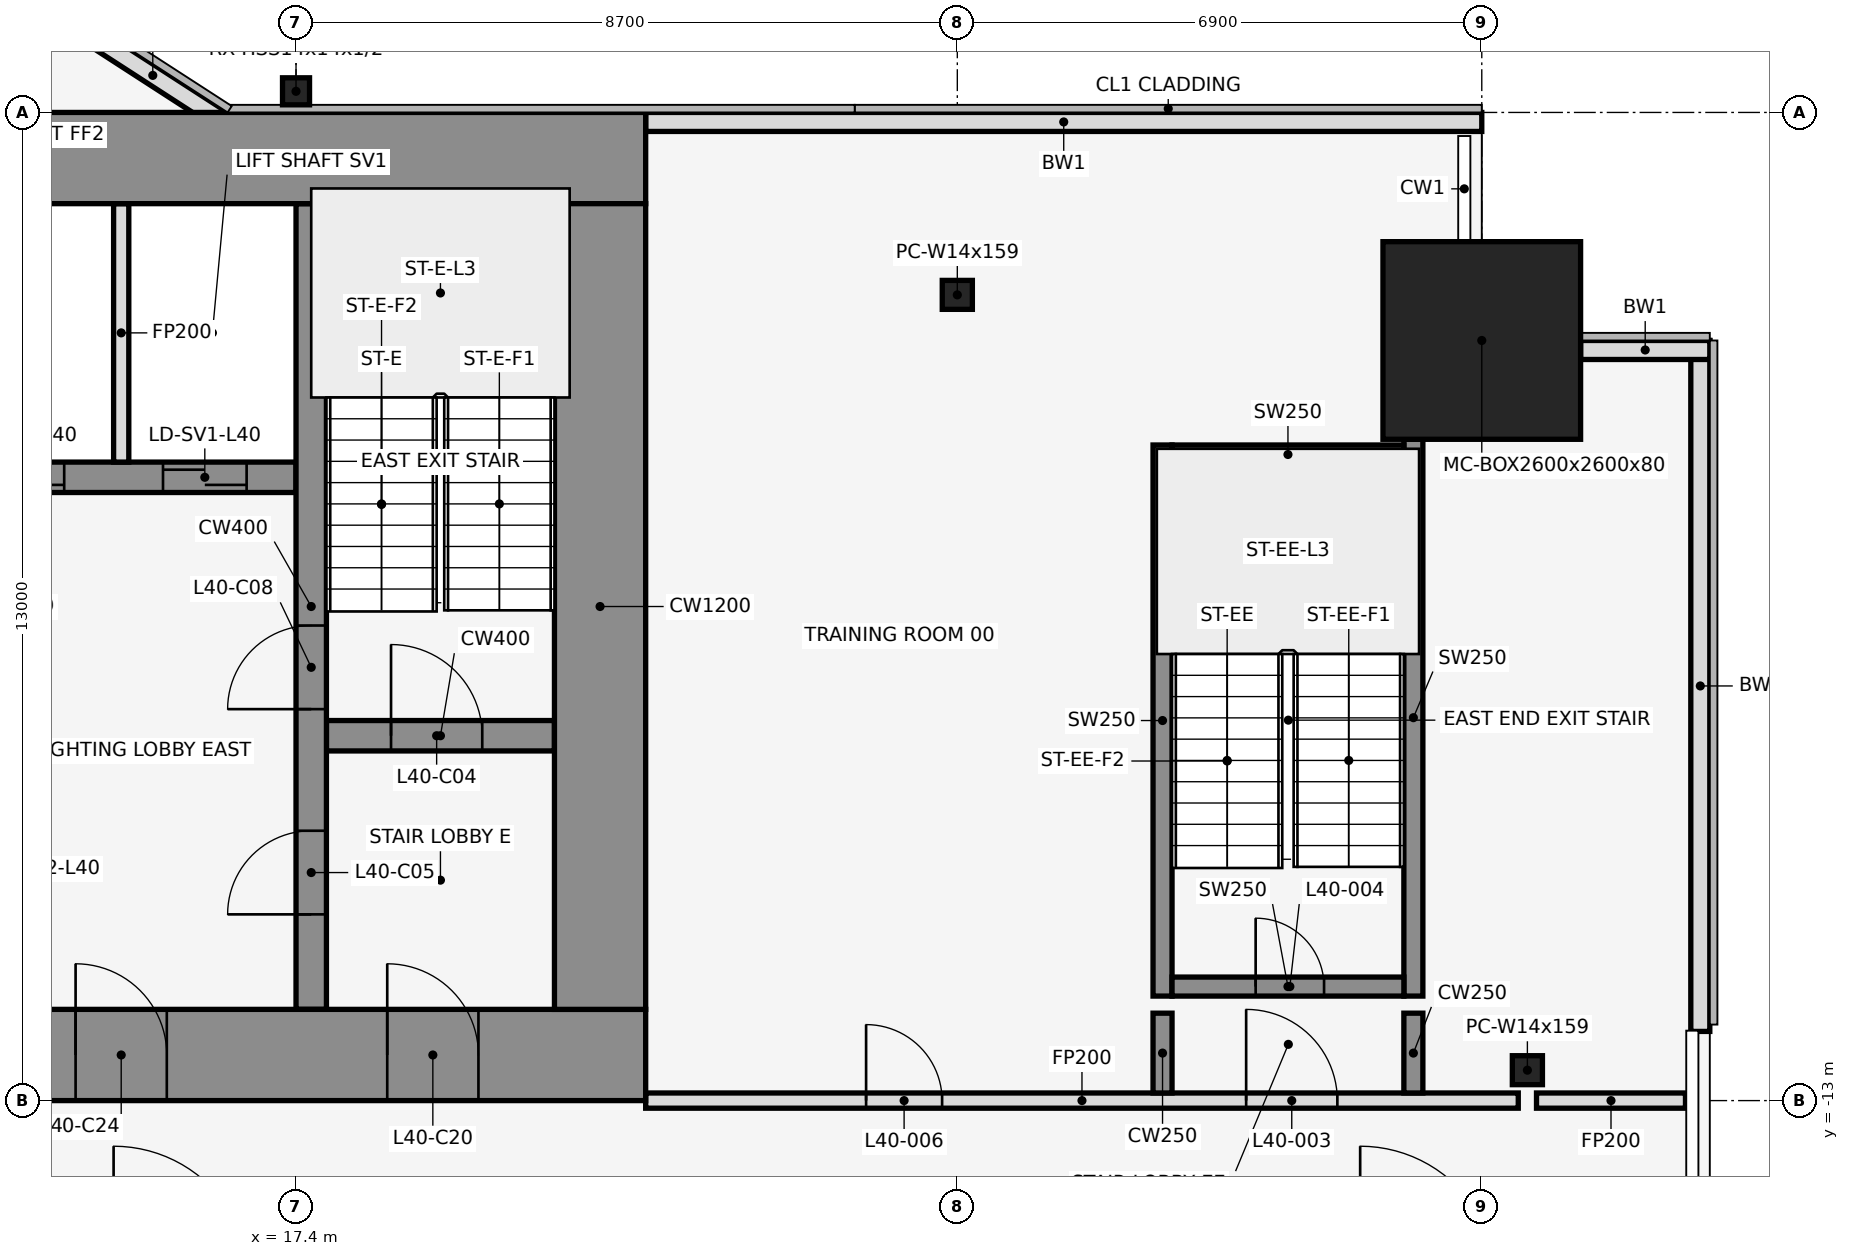
"""IFC4 building model, lengths in metres.
Left out: names, types, materials, properties, quantities, classifications, styles, units other than length and angle.
Written with IfcOpenShell. Run it as: python <this file> out.ifc"""

import sys

from ifc_helpers import new_model, si_unit, direction, frame, frame_2d, origin, origin_2d, place, context, subcontext, project, spatial, rectangle, hollow_rectangle, i_section, extrude, element, fill, save


model = new_model("IFC4")
c1 = context("Model", 3, precision=1e-05, world=origin(), true_north=direction((0.0, 1.0)))
c2 = subcontext(c1, "Body", "Model", "MODEL_VIEW")
j1 = project(units=[si_unit("LENGTHUNIT", "METRE"), si_unit("PLANEANGLEUNIT", "RADIAN")], contexts=[c1])
p1 = place(None, origin())
s1 = spatial("IfcSite", under=j1, at=p1, CompositionType="ELEMENT")
p2 = place(p1, origin())
s2 = spatial("IfcBuilding", under=s1, at=p2, CompositionType="ELEMENT")
p3 = place(p2, frame((0.0, 0.0, 181.4)))
s3 = spatial("IfcBuildingStorey", under=s2, at=p3, CompositionType="ELEMENT", Elevation=181.4)
p4 = place(p3, frame((26.1, -2.4, 0.0), z_axis=(0.0, 0.0, 1.0), x_axis=(1.0, 0.0, 0.0)))
e1 = element("IfcColumn", 1, at=p4, inside=s3, PredefinedType="COLUMN", context=c2, shape_type="SweptSolid", body=[
    extrude(i_section(OverallWidth=0.396, OverallDepth=0.381, WebThickness=0.019, FlangeThickness=0.03, at=origin_2d()), origin(), (0.0, 0.0, 1.0), 4.1),
])
p5 = place(p3, frame((33.0, -3.0, 0.0), z_axis=(0.0, 0.0, 1.0), x_axis=(1.0, 0.0, 0.0)))
e2 = element("IfcColumn", 2, at=p5, inside=s3, PredefinedType="COLUMN", context=c2, shape_type="SweptSolid", body=[
    extrude(hollow_rectangle(XDim=2.6, YDim=2.6, WallThickness=0.08, at=origin_2d()), origin(), (0.0, 0.0, 1.0), 4.1),
])
p6 = place(p3, frame((17.4, 0.278, 0.0), z_axis=(0.0, 0.0, 1.0), x_axis=(1.0, 0.0, 0.0)))
e3 = element("IfcColumn", 3, at=p6, inside=s3, PredefinedType="COLUMN", context=c2, shape_type="SweptSolid", body=[
    extrude(hollow_rectangle(XDim=0.356, YDim=0.356, WallThickness=0.012, at=origin_2d()), origin(), (0.0, 0.0, 1.0), 4.1),
])
p7 = place(p3, frame((33.6, -12.6, 0.0), z_axis=(0.0, 0.0, 1.0), x_axis=(1.0, 0.0, 0.0)))
e4 = element("IfcColumn", 4, at=p7, inside=s3, PredefinedType="COLUMN", context=c2, shape_type="SweptSolid", body=[
    extrude(i_section(OverallWidth=0.396, OverallDepth=0.381, WebThickness=0.019, FlangeThickness=0.03, at=origin_2d()), origin(), (0.0, 0.0, 1.0), 4.1),
])
p8 = place(p3, frame((33.0, -0.125, 0.0), z_axis=(0.0, 0.0, 1.0), x_axis=(-1.0, 0.0, 0.0)))
e5 = element("IfcWall", 5, at=p8, inside=s3, PredefinedType="STANDARD", context=c2, shape_type="SweptSolid", body=[
    extrude(rectangle(XDim=11.0, YDim=0.25, at=frame_2d((5.5, 0.0))), origin(), (0.0, 0.0, 1.0), 3.9),
])
p9 = place(p3, frame((16.432, -0.105, 0.0), z_axis=(0.0, 0.0, 1.0), x_axis=(-0.83981312244, 0.542875602121, 0.0)))
e6 = element("IfcWall", 6, at=p9, inside=s3, PredefinedType="STANDARD", context=c2, shape_type="SweptSolid", body=[
    extrude(rectangle(XDim=2.183, YDim=0.25, at=frame_2d((1.091, 0.0))), origin(), (0.0, 0.0, 1.0), 3.9),
])
p10 = place(p3, frame((35.875, -12.09, 0.0), z_axis=(0.0, 0.0, 1.0), x_axis=(0.0, 1.0, 0.0)))
e7 = element("IfcWall", 7, at=p10, inside=s3, PredefinedType="STANDARD", context=c2, shape_type="SweptSolid", body=[
    extrude(rectangle(XDim=9.09, YDim=0.25, at=frame_2d((4.545, 0.0))), origin(), (0.0, 0.0, 1.0), 3.9),
])
p11 = place(p3, frame((36.0, -3.125, 0.0), z_axis=(0.0, 0.0, 1.0), x_axis=(-1.0, 0.0, 0.0)))
e8 = element("IfcWall", 8, at=p11, inside=s3, PredefinedType="STANDARD", context=c2, shape_type="SweptSolid", body=[
    extrude(rectangle(XDim=1.7, YDim=0.25, at=frame_2d((0.85, 0.0))), origin(), (0.0, 0.0, 1.0), 3.9),
])
p12 = place(p3, frame((28.8, -11.625, 0.0), z_axis=(0.0, 0.0, 1.0), x_axis=(0.0, 1.0, 0.0)))
e9 = element("IfcWall", 9, at=p12, inside=s3, PredefinedType="SHEAR", context=c2, shape_type="SweptSolid", body=[
    extrude(rectangle(XDim=7.25, YDim=0.25, at=frame_2d((3.625, 0.0))), origin(), (0.0, 0.0, 1.0), 4.1),
])
p13 = place(p3, frame((32.1, -11.625, 0.0), z_axis=(0.0, 0.0, 1.0), x_axis=(0.0, 1.0, 0.0)))
e10 = element("IfcWall", 10, at=p13, inside=s3, PredefinedType="SHEAR", context=c2, shape_type="SweptSolid", body=[
    extrude(rectangle(XDim=7.325, YDim=0.25, at=frame_2d((3.663, 0.0))), origin(), (0.0, 0.0, 1.0), 4.1),
])
p14 = place(p3, frame((28.925, -11.5, 0.0), z_axis=(0.0, 0.0, 1.0), x_axis=(1.0, 0.0, 0.0)))
e11 = element("IfcWall", 11, at=p14, inside=s3, PredefinedType="SHEAR", context=c2, shape_type="SweptSolid", body=[
    extrude(rectangle(XDim=3.05, YDim=0.25, at=frame_2d((1.525, 0.0))), origin(), (0.0, 0.0, 1.0), 4.1),
])
p15 = place(p14, frame((1.1, 0.0, 0.0)))
e12 = element("IfcOpeningElement", 12, at=p15, cuts=e11, PredefinedType="OPENING", context=c2, shape_type="SweptSolid", body=[
    extrude(rectangle(XDim=0.9, YDim=2.1, at=frame_2d((0.45, 1.05))), frame((0.0, 0.137, 0.0), z_axis=(0.0, -1.0, 0.0), x_axis=(1.0, 0.0, 0.0)), (0.0, 0.0, 1.0), 0.274),
])
p16 = place(p3, frame((28.925, -4.5, 0.0), z_axis=(0.0, 0.0, 1.0), x_axis=(1.0, 0.0, 0.0)))
e13 = element("IfcWall", 13, at=p16, inside=s3, PredefinedType="SHEAR", context=c2, shape_type="SweptSolid", body=[
    extrude(rectangle(XDim=3.05, YDim=0.25, at=frame_2d((1.525, 0.0))), origin(), (0.0, 0.0, 1.0), 4.1),
])
p17 = place(p3, frame((22.0, -13.0, 0.0), z_axis=(0.0, 0.0, 1.0), x_axis=(1.0, 0.0, 0.0)))
e14 = element("IfcWall", 14, at=p17, inside=s3, PredefinedType="PARTITIONING", context=c2, shape_type="SweptSolid", body=[
    extrude(rectangle(XDim=11.48, YDim=0.2, at=frame_2d((5.74, 0.0))), origin(), (0.0, 0.0, 1.0), 2.79),
])
p18 = place(p17, frame((7.9, 0.0, 0.0)))
e15 = element("IfcOpeningElement", 15, at=p18, cuts=e14, PredefinedType="OPENING", context=c2, shape_type="SweptSolid", body=[
    extrude(rectangle(XDim=1.2, YDim=2.1, at=frame_2d((0.6, 1.05))), frame((0.0, 0.112, 0.0), z_axis=(0.0, -1.0, 0.0), x_axis=(1.0, 0.0, 0.0)), (0.0, 0.0, 1.0), 0.224),
])
p19 = place(p17, frame((2.9, 0.0, 0.0)))
e16 = element("IfcOpeningElement", 16, at=p19, cuts=e14, PredefinedType="OPENING", context=c2, shape_type="SweptSolid", body=[
    extrude(rectangle(XDim=1.0, YDim=2.1, at=frame_2d((0.5, 1.05))), frame((0.0, 0.112, 0.0), z_axis=(0.0, -1.0, 0.0), x_axis=(1.0, 0.0, 0.0)), (0.0, 0.0, 1.0), 0.224),
])
p20 = place(p3, frame((33.72, -13.0, 0.0), z_axis=(0.0, 0.0, 1.0), x_axis=(1.0, 0.0, 0.0)))
e17 = element("IfcWall", 17, at=p20, inside=s3, PredefinedType="PARTITIONING", context=c2, shape_type="SweptSolid", body=[
    extrude(rectangle(XDim=1.96, YDim=0.2, at=frame_2d((0.98, 0.0))), origin(), (0.0, 0.0, 1.0), 2.79),
])
for number, where, z_axis, x_axis in (
    (18, (28.8, -12.9, 0.0), (0.0, 0.0, 1.0), (0.0, 1.0, 0.0)),
    (19, (32.1, -12.9, 0.0), (0.0, 0.0, 1.0), (0.0, 1.0, 0.0)),
):
    element("IfcWall", number, at=place(p3, frame(where, z_axis=z_axis, x_axis=x_axis)), inside=s3, PredefinedType="SHEAR", context=c2, shape_type="SweptSolid", body=[
        extrude(rectangle(XDim=1.05, YDim=0.25, at=frame_2d((0.525, 0.0))), origin(), (0.0, 0.0, 1.0), 4.1),
    ])
p21 = place(p3, frame((17.8, -8.2, 0.0), z_axis=(0.0, 0.0, 1.0), x_axis=(1.0, 0.0, 0.0)))
e20 = element("IfcWall", 20, at=p21, inside=s3, PredefinedType="SHEAR", context=c2, shape_type="SweptSolid", body=[
    extrude(rectangle(XDim=3.0, YDim=0.4, at=frame_2d((1.5, 0.0))), origin(), (0.0, 0.0, 1.0), 4.1),
])
p22 = place(p21, frame((0.85, 0.0, 0.0)))
e21 = element("IfcOpeningElement", 21, at=p22, cuts=e20, PredefinedType="OPENING", context=c2, shape_type="SweptSolid", body=[
    extrude(rectangle(XDim=1.2, YDim=2.1, at=frame_2d((0.6, 1.05))), frame((0.0, 0.212, 0.0), z_axis=(0.0, -1.0, 0.0), x_axis=(1.0, 0.0, 0.0)), (0.0, 0.0, 1.0), 0.424),
])
p23 = place(p3, frame((3.8, -4.8, 0.0), z_axis=(0.0, 0.0, 1.0), x_axis=(1.0, 0.0, 0.0)))
e22 = element("IfcWall", 22, at=p23, inside=s3, PredefinedType="SHEAR", context=c2, shape_type="SweptSolid", body=[
    extrude(rectangle(XDim=13.6, YDim=0.4, at=frame_2d((6.8, 0.0))), origin(), (0.0, 0.0, 1.0), 4.1),
])
p24 = place(p23, frame((9.45, 0.0, 0.0)))
e23 = element("IfcOpeningElement", 23, at=p24, cuts=e22, PredefinedType="OPENING", context=c2, shape_type="SweptSolid", body=[
    extrude(rectangle(XDim=1.1, YDim=2.1, at=frame_2d((0.55, 1.05))), frame((0.0, 0.212, 0.0), z_axis=(0.0, -1.0, 0.0), x_axis=(1.0, 0.0, 0.0)), (0.0, 0.0, 1.0), 0.424),
])
p25 = place(p23, frame((11.85, 0.0, 0.0)))
e24 = element("IfcOpeningElement", 24, at=p25, cuts=e22, PredefinedType="OPENING", context=c2, shape_type="SweptSolid", body=[
    extrude(rectangle(XDim=1.1, YDim=2.1, at=frame_2d((0.55, 1.05))), frame((0.0, 0.212, 0.0), z_axis=(0.0, -1.0, 0.0), x_axis=(1.0, 0.0, 0.0)), (0.0, 0.0, 1.0), 0.424),
])
p26 = place(p23, frame((3.95, 0.0, 0.0)))
e25 = element("IfcOpeningElement", 25, at=p26, cuts=e22, PredefinedType="OPENING", context=c2, shape_type="SweptSolid", body=[
    extrude(rectangle(XDim=0.9, YDim=2.1, at=frame_2d((0.45, 1.05))), frame((0.0, 0.212, 0.0), z_axis=(0.0, -1.0, 0.0), x_axis=(1.0, 0.0, 0.0)), (0.0, 0.0, 1.0), 0.424),
])
p27 = place(p3, frame((15.1, -4.6, 0.0), z_axis=(0.0, 0.0, 1.0), x_axis=(0.0, 1.0, 0.0)))
e26 = element("IfcWall", 26, at=p27, inside=s3, PredefinedType="PARTITIONING", context=c2, shape_type="SweptSolid", body=[
    extrude(rectangle(XDim=3.4, YDim=0.2, at=frame_2d((1.7, 0.0))), origin(), (0.0, 0.0, 1.0), 2.79),
])
p28 = place(p3, frame((17.6, -11.8, 0.0), z_axis=(0.0, 0.0, 1.0), x_axis=(0.0, 1.0, 0.0)))
e27 = element("IfcWall", 27, at=p28, inside=s3, PredefinedType="SHEAR", context=c2, shape_type="SweptSolid", body=[
    extrude(rectangle(XDim=10.6, YDim=0.4, at=frame_2d((5.3, 0.0))), origin(), (0.0, 0.0, 1.0), 4.1),
])
p29 = place(p28, frame((1.25, 0.0, 0.0)))
e28 = element("IfcOpeningElement", 28, at=p29, cuts=e27, PredefinedType="OPENING", context=c2, shape_type="SweptSolid", body=[
    extrude(rectangle(XDim=1.1, YDim=2.1, at=frame_2d((0.55, 1.05))), frame((0.0, 0.212, 0.0), z_axis=(0.0, -1.0, 0.0), x_axis=(1.0, 0.0, 0.0)), (0.0, 0.0, 1.0), 0.424),
])
p30 = place(p28, frame((3.95, 0.0, 0.0)))
e29 = element("IfcOpeningElement", 29, at=p30, cuts=e27, PredefinedType="OPENING", context=c2, shape_type="SweptSolid", body=[
    extrude(rectangle(XDim=1.1, YDim=2.1, at=frame_2d((0.55, 1.05))), frame((0.0, 0.212, 0.0), z_axis=(0.0, -1.0, 0.0), x_axis=(1.0, 0.0, 0.0)), (0.0, 0.0, 1.0), 0.424),
])
p31 = place(p3, frame((-22.0, -0.6, 0.0), z_axis=(0.0, 0.0, 1.0), x_axis=(1.0, 0.0, 0.0)))
e30 = element("IfcWall", 30, at=p31, inside=s3, PredefinedType="SHEAR", context=c2, shape_type="SweptSolid", body=[
    extrude(rectangle(XDim=44.0, YDim=1.2, at=frame_2d((22.0, 0.0))), origin(), (0.0, 0.0, 1.0), 4.1),
])
p32 = place(p31, frame((18.55, 0.0, 0.0)))
e31 = element("IfcOpeningElement", 31, at=p32, cuts=e30, PredefinedType="OPENING", context=c2, shape_type="SweptSolid", body=[
    extrude(rectangle(XDim=0.9, YDim=2.1, at=frame_2d((0.45, 1.05))), frame((0.0, 0.612, 0.0), z_axis=(0.0, -1.0, 0.0), x_axis=(1.0, 0.0, 0.0)), (0.0, 0.0, 1.0), 1.224),
])
p33 = place(p31, frame((24.55, 0.0, 0.0)))
e32 = element("IfcOpeningElement", 32, at=p33, cuts=e30, PredefinedType="OPENING", context=c2, shape_type="SweptSolid", body=[
    extrude(rectangle(XDim=0.9, YDim=2.1, at=frame_2d((0.45, 1.05))), frame((0.0, 0.612, 0.0), z_axis=(0.0, -1.0, 0.0), x_axis=(1.0, 0.0, 0.0)), (0.0, 0.0, 1.0), 1.224),
])
p34 = place(p3, frame((-22.0, -12.4, 0.0), z_axis=(0.0, 0.0, 1.0), x_axis=(1.0, 0.0, 0.0)))
e33 = element("IfcWall", 33, at=p34, inside=s3, PredefinedType="SHEAR", context=c2, shape_type="SweptSolid", body=[
    extrude(rectangle(XDim=44.0, YDim=1.2, at=frame_2d((22.0, 0.0))), origin(), (0.0, 0.0, 1.0), 4.1),
])
p35 = place(p34, frame((2.2, 0.0, 0.0)))
e34 = element("IfcOpeningElement", 34, at=p35, cuts=e33, PredefinedType="OPENING", context=c2, shape_type="SweptSolid", body=[
    extrude(rectangle(XDim=1.2, YDim=2.1, at=frame_2d((0.6, 1.05))), frame((0.0, 0.612, 0.0), z_axis=(0.0, -1.0, 0.0), x_axis=(1.0, 0.0, 0.0)), (0.0, 0.0, 1.0), 1.224),
])
p36 = place(p34, frame((21.4, 0.0, 0.0)))
e35 = element("IfcOpeningElement", 35, at=p36, cuts=e33, PredefinedType="OPENING", context=c2, shape_type="SweptSolid", body=[
    extrude(rectangle(XDim=1.2, YDim=2.1, at=frame_2d((0.6, 1.05))), frame((0.0, 0.612, 0.0), z_axis=(0.0, -1.0, 0.0), x_axis=(1.0, 0.0, 0.0)), (0.0, 0.0, 1.0), 1.224),
])
p37 = place(p34, frame((40.6, 0.0, 0.0)))
e36 = element("IfcOpeningElement", 36, at=p37, cuts=e33, PredefinedType="OPENING", context=c2, shape_type="SweptSolid", body=[
    extrude(rectangle(XDim=1.2, YDim=2.1, at=frame_2d((0.6, 1.05))), frame((0.0, 0.612, 0.0), z_axis=(0.0, -1.0, 0.0), x_axis=(1.0, 0.0, 0.0)), (0.0, 0.0, 1.0), 1.224),
])
p38 = place(p34, frame((16.0, 0.0, 0.0)))
e37 = element("IfcOpeningElement", 37, at=p38, cuts=e33, PredefinedType="OPENING", context=c2, shape_type="SweptSolid", body=[
    extrude(rectangle(XDim=1.8, YDim=2.1, at=frame_2d((0.9, 1.05))), frame((0.0, 0.612, 0.0), z_axis=(0.0, -1.0, 0.0), x_axis=(1.0, 0.0, 0.0)), (0.0, 0.0, 1.0), 1.224),
])
p39 = place(p34, frame((6.3, 0.0, 0.0)))
e38 = element("IfcOpeningElement", 38, at=p39, cuts=e33, PredefinedType="OPENING", context=c2, shape_type="SweptSolid", body=[
    extrude(rectangle(XDim=1.2, YDim=2.1, at=frame_2d((0.6, 1.05))), frame((0.0, 0.612, 0.0), z_axis=(0.0, -1.0, 0.0), x_axis=(1.0, 0.0, 0.0)), (0.0, 0.0, 1.0), 1.224),
])
p40 = place(p34, frame((26.2, 0.0, 0.0)))
e39 = element("IfcOpeningElement", 39, at=p40, cuts=e33, PredefinedType="OPENING", context=c2, shape_type="SweptSolid", body=[
    extrude(rectangle(XDim=1.8, YDim=2.1, at=frame_2d((0.9, 1.05))), frame((0.0, 0.612, 0.0), z_axis=(0.0, -1.0, 0.0), x_axis=(1.0, 0.0, 0.0)), (0.0, 0.0, 1.0), 1.224),
])
p41 = place(p34, frame((36.5, 0.0, 0.0)))
e40 = element("IfcOpeningElement", 40, at=p41, cuts=e33, PredefinedType="OPENING", context=c2, shape_type="SweptSolid", body=[
    extrude(rectangle(XDim=1.2, YDim=2.1, at=frame_2d((0.6, 1.05))), frame((0.0, 0.612, 0.0), z_axis=(0.0, -1.0, 0.0), x_axis=(1.0, 0.0, 0.0)), (0.0, 0.0, 1.0), 1.224),
])
p42 = place(p3, frame((21.4, -11.8, 0.0), z_axis=(0.0, 0.0, 1.0), x_axis=(0.0, 1.0, 0.0)))
e41 = element("IfcWall", 41, at=p42, inside=s3, PredefinedType="SHEAR", context=c2, shape_type="SweptSolid", body=[
    extrude(rectangle(XDim=10.6, YDim=1.2, at=frame_2d((5.3, 0.0))), origin(), (0.0, 0.0, 1.0), 4.1),
])
p43 = place(p18, origin())
e42 = element("IfcDoor", 42, at=p43, inside=s3, OperationType="SINGLE_SWING_RIGHT", PredefinedType="DOOR", context=c2, shape_type="SweptSolid", body=[
    extrude(rectangle(XDim=1.2, YDim=2.1, at=frame_2d((0.6, 1.05))), frame((0.0, 0.025, 0.0), z_axis=(0.0, -1.0, 0.0), x_axis=(1.0, 0.0, 0.0)), (0.0, 0.0, 1.0), 0.05),
])
fill(e15, e42)
p44 = place(p15, origin())
e43 = element("IfcDoor", 43, at=p44, inside=s3, OperationType="SINGLE_SWING_LEFT", PredefinedType="DOOR", context=c2, shape_type="SweptSolid", body=[
    extrude(rectangle(XDim=0.9, YDim=2.1, at=frame_2d((0.45, 1.05))), frame((0.0, 0.025, 0.0), z_axis=(0.0, -1.0, 0.0), x_axis=(1.0, 0.0, 0.0)), (0.0, 0.0, 1.0), 0.05),
])
fill(e12, e43)
p45 = place(p19, origin())
e44 = element("IfcDoor", 44, at=p45, inside=s3, OperationType="SINGLE_SWING_RIGHT", PredefinedType="DOOR", context=c2, shape_type="SweptSolid", body=[
    extrude(rectangle(XDim=1.0, YDim=2.1, at=frame_2d((0.5, 1.05))), frame((0.0, 0.025, 0.0), z_axis=(0.0, -1.0, 0.0), x_axis=(1.0, 0.0, 0.0)), (0.0, 0.0, 1.0), 0.05),
])
fill(e16, e44)
p46 = place(p22, origin())
e45 = element("IfcDoor", 45, at=p46, inside=s3, OperationType="SINGLE_SWING_RIGHT", PredefinedType="DOOR", context=c2, shape_type="SweptSolid", body=[
    extrude(rectangle(XDim=1.2, YDim=2.1, at=frame_2d((0.6, 1.05))), frame((0.0, 0.025, 0.0), z_axis=(0.0, -1.0, 0.0), x_axis=(1.0, 0.0, 0.0)), (0.0, 0.0, 1.0), 0.05),
])
fill(e21, e45)
p47 = place(p29, origin())
e46 = element("IfcDoor", 46, at=p47, inside=s3, OperationType="SINGLE_SWING_LEFT", PredefinedType="DOOR", context=c2, shape_type="SweptSolid", body=[
    extrude(rectangle(XDim=1.1, YDim=2.1, at=frame_2d((0.55, 1.05))), frame((0.0, 0.025, 0.0), z_axis=(0.0, -1.0, 0.0), x_axis=(1.0, 0.0, 0.0)), (0.0, 0.0, 1.0), 0.05),
])
fill(e28, e46)
p48 = place(p24, origin())
e47 = element("IfcDoor", 47, at=p48, inside=s3, OperationType="DOUBLE_DOOR_SLIDING", PredefinedType="DOOR", context=c2, shape_type="SweptSolid", body=[
    extrude(rectangle(XDim=1.1, YDim=2.1, at=frame_2d((0.55, 1.05))), frame((0.0, 0.025, 0.0), z_axis=(0.0, -1.0, 0.0), x_axis=(1.0, 0.0, 0.0)), (0.0, 0.0, 1.0), 0.05),
])
fill(e23, e47)
p49 = place(p25, origin())
e48 = element("IfcDoor", 48, at=p49, inside=s3, OperationType="DOUBLE_DOOR_SLIDING", PredefinedType="DOOR", context=c2, shape_type="SweptSolid", body=[
    extrude(rectangle(XDim=1.1, YDim=2.1, at=frame_2d((0.55, 1.05))), frame((0.0, 0.025, 0.0), z_axis=(0.0, -1.0, 0.0), x_axis=(1.0, 0.0, 0.0)), (0.0, 0.0, 1.0), 0.05),
])
fill(e24, e48)
p50 = place(p30, origin())
e49 = element("IfcDoor", 49, at=p50, inside=s3, OperationType="SINGLE_SWING_RIGHT", PredefinedType="DOOR", context=c2, shape_type="SweptSolid", body=[
    extrude(rectangle(XDim=1.1, YDim=2.1, at=frame_2d((0.55, 1.05))), frame((0.0, 0.025, 0.0), z_axis=(0.0, -1.0, 0.0), x_axis=(1.0, 0.0, 0.0)), (0.0, 0.0, 1.0), 0.05),
])
fill(e29, e49)
p51 = place(p37, frame((1.2, 0.0, 0.0), z_axis=(0.0, 0.0, 1.0), x_axis=(-1.0, 0.0, 0.0)))
e50 = element("IfcDoor", 50, at=p51, inside=s3, OperationType="SINGLE_SWING_RIGHT", PredefinedType="DOOR", context=c2, shape_type="SweptSolid", body=[
    extrude(rectangle(XDim=1.2, YDim=2.1, at=frame_2d((0.6, 1.05))), frame((0.0, 0.025, 0.0), z_axis=(0.0, -1.0, 0.0), x_axis=(1.0, 0.0, 0.0)), (0.0, 0.0, 1.0), 0.05),
])
fill(e36, e50)
p52 = place(p41, frame((1.2, 0.0, 0.0), z_axis=(0.0, 0.0, 1.0), x_axis=(-1.0, 0.0, 0.0)))
e51 = element("IfcDoor", 51, at=p52, inside=s3, OperationType="SINGLE_SWING_RIGHT", PredefinedType="DOOR", context=c2, shape_type="SweptSolid", body=[
    extrude(rectangle(XDim=1.2, YDim=2.1, at=frame_2d((0.6, 1.05))), frame((0.0, 0.025, 0.0), z_axis=(0.0, -1.0, 0.0), x_axis=(1.0, 0.0, 0.0)), (0.0, 0.0, 1.0), 0.05),
])
fill(e40, e51)
save(model, sys.argv[1])
